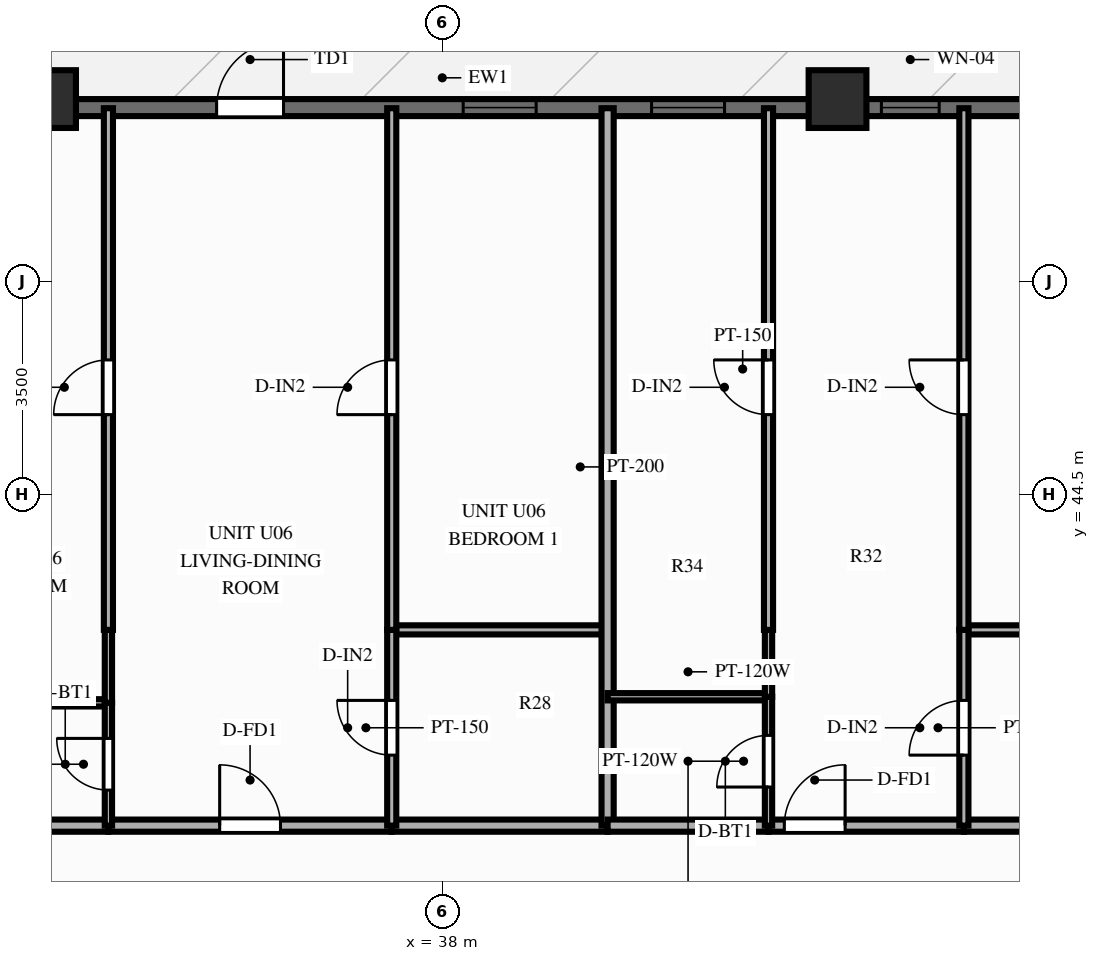
"""IFC4 building model, lengths in metres.
Left out: names, types, materials, properties, quantities, classifications, styles, units other than length and angle.
Written with IfcOpenShell. Run it as: python <this file> out.ifc"""

import sys

from ifc_helpers import new_model, si_unit, direction, frame, frame_2d, origin, origin_2d, place, context, subcontext, project, spatial, rectangle, extrude, source, transform, mapped, element, fill, save


model = new_model("IFC4")
c1 = context("Model", 3, precision=1e-05, world=origin(), true_north=direction((0.0, 1.0)))
c2 = subcontext(c1, "Body", "Model", "MODEL_VIEW")
j1 = project(units=[si_unit("LENGTHUNIT", "METRE"), si_unit("PLANEANGLEUNIT", "RADIAN")], contexts=[c1])
p1 = place(None, origin())
s1 = spatial("IfcSite", under=j1, at=p1, CompositionType="ELEMENT")
p2 = place(p1, origin())
s2 = spatial("IfcBuilding", under=s1, at=p2, CompositionType="ELEMENT")
p3 = place(p2, frame((0.0, 0.0, 89.85)))
s3 = spatial("IfcBuildingStorey", under=s2, at=p3, CompositionType="ELEMENT", Elevation=89.85)
m1 = source(origin(), c2, "Body", "SweptSolid", [
    extrude(rectangle(XDim=0.95, YDim=0.95, at=origin_2d()), origin(), (0.0, 0.0, 1.0), 3.0),
])
for number, where, z_axis, x_axis in (
    (1, (44.5, 51.0, 0.0), (0.0, 0.0, 1.0), (1.0, 0.0, 0.0)),
    (2, (31.5, 51.0, 0.0), (0.0, 0.0, 1.0), (1.0, 0.0, 0.0)),
):
    element("IfcColumn", number, at=place(p3, frame(where, z_axis=z_axis, x_axis=x_axis)), inside=s3, PredefinedType="COLUMN", context=c2, shape_type="MappedRepresentation", body=[
        mapped(m1, transform((0.0, 0.0, 0.0), scale=1.0)),
    ])
p4 = place(p3, frame((16.2, 50.86, 0.0), z_axis=(0.0, 0.0, 1.0), x_axis=(1.0, 0.0, 0.0)))
e3 = element("IfcWall", 3, at=p4, inside=s3, PredefinedType="SOLIDWALL", context=c2, shape_type="SweptSolid", body=[
    extrude(rectangle(XDim=43.6, YDim=0.28, at=frame_2d((21.8, 0.0))), origin(), (0.0, 0.0, 1.0), 2.28),
])
p5 = place(p4, frame((0.722, 0.0, 0.25)))
e4 = element("IfcOpeningElement", 4, at=p5, cuts=e3, PredefinedType="OPENING", context=c2, shape_type="SweptSolid", body=[
    extrude(rectangle(XDim=1.2, YDim=1.5, at=frame_2d((0.6, 0.75))), frame((0.0, 0.152, 0.0), z_axis=(0.0, -1.0, 0.0), x_axis=(1.0, 0.0, 0.0)), (0.0, 0.0, 1.0), 0.304),
])
p6 = place(p4, frame((3.172, 0.0, 0.25)))
e5 = element("IfcOpeningElement", 5, at=p6, cuts=e3, PredefinedType="OPENING", context=c2, shape_type="SweptSolid", body=[
    extrude(rectangle(XDim=1.2, YDim=1.5, at=frame_2d((0.6, 0.75))), frame((0.0, 0.152, 0.0), z_axis=(0.0, -1.0, 0.0), x_axis=(1.0, 0.0, 0.0)), (0.0, 0.0, 1.0), 0.304),
])
p7 = place(p4, frame((6.944, 0.0, 0.25)))
e6 = element("IfcOpeningElement", 6, at=p7, cuts=e3, PredefinedType="OPENING", context=c2, shape_type="SweptSolid", body=[
    extrude(rectangle(XDim=1.2, YDim=1.5, at=frame_2d((0.6, 0.75))), frame((0.0, 0.152, 0.0), z_axis=(0.0, -1.0, 0.0), x_axis=(1.0, 0.0, 0.0)), (0.0, 0.0, 1.0), 0.304),
])
p8 = place(p4, frame((11.049, 0.0, 0.25)))
e7 = element("IfcOpeningElement", 7, at=p8, cuts=e3, PredefinedType="OPENING", context=c2, shape_type="SweptSolid", body=[
    extrude(rectangle(XDim=1.2, YDim=1.5, at=frame_2d((0.6, 0.75))), frame((0.0, 0.152, 0.0), z_axis=(0.0, -1.0, 0.0), x_axis=(1.0, 0.0, 0.0)), (0.0, 0.0, 1.0), 0.304),
])
p9 = place(p4, frame((13.73, 0.0, 0.25)))
e8 = element("IfcOpeningElement", 8, at=p9, cuts=e3, PredefinedType="OPENING", context=c2, shape_type="SweptSolid", body=[
    extrude(rectangle(XDim=0.95, YDim=1.5, at=frame_2d((0.475, 0.75))), frame((0.0, 0.152, 0.0), z_axis=(0.0, -1.0, 0.0), x_axis=(1.0, 0.0, 0.0)), (0.0, 0.0, 1.0), 0.304),
])
p10 = place(p4, frame((18.089, 0.0, 0.0)))
e9 = element("IfcOpeningElement", 9, at=p10, cuts=e3, PredefinedType="OPENING", context=c2, shape_type="SweptSolid", body=[
    extrude(rectangle(XDim=1.1, YDim=2.15, at=frame_2d((0.55, 1.075))), frame((0.0, 0.152, 0.0), z_axis=(0.0, -1.0, 0.0), x_axis=(1.0, 0.0, 0.0)), (0.0, 0.0, 1.0), 0.304),
])
p11 = place(p4, frame((22.144, 0.0, 0.25)))
e10 = element("IfcOpeningElement", 10, at=p11, cuts=e3, PredefinedType="OPENING", context=c2, shape_type="SweptSolid", body=[
    extrude(rectangle(XDim=1.2, YDim=1.5, at=frame_2d((0.6, 0.75))), frame((0.0, 0.152, 0.0), z_axis=(0.0, -1.0, 0.0), x_axis=(1.0, 0.0, 0.0)), (0.0, 0.0, 1.0), 0.304),
])
p12 = place(p4, frame((25.242, 0.0, 0.25)))
e11 = element("IfcOpeningElement", 11, at=p12, cuts=e3, PredefinedType="OPENING", context=c2, shape_type="SweptSolid", body=[
    extrude(rectangle(XDim=1.2, YDim=1.5, at=frame_2d((0.6, 0.75))), frame((0.0, 0.152, 0.0), z_axis=(0.0, -1.0, 0.0), x_axis=(1.0, 0.0, 0.0)), (0.0, 0.0, 1.0), 0.304),
])
p13 = place(p4, frame((29.021, 0.0, 0.25)))
e12 = element("IfcOpeningElement", 12, at=p13, cuts=e3, PredefinedType="OPENING", context=c2, shape_type="SweptSolid", body=[
    extrude(rectangle(XDim=0.95, YDim=1.5, at=frame_2d((0.475, 0.75))), frame((0.0, 0.152, 0.0), z_axis=(0.0, -1.0, 0.0), x_axis=(1.0, 0.0, 0.0)), (0.0, 0.0, 1.0), 0.304),
])
p14 = place(p4, frame((31.574, 0.0, 0.25)))
e13 = element("IfcOpeningElement", 13, at=p14, cuts=e3, PredefinedType="OPENING", context=c2, shape_type="SweptSolid", body=[
    extrude(rectangle(XDim=1.2, YDim=1.5, at=frame_2d((0.6, 0.75))), frame((0.0, 0.152, 0.0), z_axis=(0.0, -1.0, 0.0), x_axis=(1.0, 0.0, 0.0)), (0.0, 0.0, 1.0), 0.304),
])
p15 = place(p4, frame((34.692, 0.0, 0.25)))
e14 = element("IfcOpeningElement", 14, at=p15, cuts=e3, PredefinedType="OPENING", context=c2, shape_type="SweptSolid", body=[
    extrude(rectangle(XDim=1.2, YDim=1.5, at=frame_2d((0.6, 0.75))), frame((0.0, 0.152, 0.0), z_axis=(0.0, -1.0, 0.0), x_axis=(1.0, 0.0, 0.0)), (0.0, 0.0, 1.0), 0.304),
])
p16 = place(p4, frame((37.622, 0.0, 0.25)))
e15 = element("IfcOpeningElement", 15, at=p16, cuts=e3, PredefinedType="OPENING", context=c2, shape_type="SweptSolid", body=[
    extrude(rectangle(XDim=1.2, YDim=1.5, at=frame_2d((0.6, 0.75))), frame((0.0, 0.152, 0.0), z_axis=(0.0, -1.0, 0.0), x_axis=(1.0, 0.0, 0.0)), (0.0, 0.0, 1.0), 0.304),
])
p17 = place(p4, frame((40.957, 0.0, 0.25)))
e16 = element("IfcOpeningElement", 16, at=p17, cuts=e3, PredefinedType="OPENING", context=c2, shape_type="SweptSolid", body=[
    extrude(rectangle(XDim=1.2, YDim=1.5, at=frame_2d((0.6, 0.75))), frame((0.0, 0.152, 0.0), z_axis=(0.0, -1.0, 0.0), x_axis=(1.0, 0.0, 0.0)), (0.0, 0.0, 1.0), 0.304),
])
p18 = place(p3, frame((29.624, 39.05, 0.0), z_axis=(0.0, 0.0, 1.0), x_axis=(1.0, 0.0, 0.0)))
e17 = element("IfcWall", 17, at=p18, inside=s3, PredefinedType="PARTITIONING", context=c2, shape_type="SweptSolid", body=[
    extrude(rectangle(XDim=2.885, YDim=0.2, at=frame_2d((1.442, 0.0))), origin(), (0.0, 0.0, 1.0), 2.79),
])
p19 = place(p3, frame((32.509, 39.05, 0.0), z_axis=(0.0, 0.0, 1.0), x_axis=(1.0, 0.0, 0.0)))
e18 = element("IfcWall", 18, at=p19, inside=s3, PredefinedType="PARTITIONING", context=c2, shape_type="SweptSolid", body=[
    extrude(rectangle(XDim=4.66, YDim=0.2, at=frame_2d((2.33, 0.0))), origin(), (0.0, 0.0, 1.0), 2.79),
])
p20 = place(p19, frame((1.83, 0.0, 0.0)))
e19 = element("IfcOpeningElement", 19, at=p20, cuts=e18, PredefinedType="OPENING", context=c2, shape_type="SweptSolid", body=[
    extrude(rectangle(XDim=1.0, YDim=2.15, at=frame_2d((0.5, 1.075))), frame((0.0, 0.112, 0.0), z_axis=(0.0, -1.0, 0.0), x_axis=(1.0, 0.0, 0.0)), (0.0, 0.0, 1.0), 0.224),
])
p21 = place(p3, frame((37.168, 39.05, 0.0), z_axis=(0.0, 0.0, 1.0), x_axis=(1.0, 0.0, 0.0)))
e20 = element("IfcWall", 20, at=p21, inside=s3, PredefinedType="PARTITIONING", context=c2, shape_type="SweptSolid", body=[
    extrude(rectangle(XDim=3.55, YDim=0.2, at=frame_2d((1.775, 0.0))), origin(), (0.0, 0.0, 1.0), 2.79),
])
p22 = place(p3, frame((29.624, 41.07, 0.0), z_axis=(0.0, 0.0, 1.0), x_axis=(1.0, 0.0, 0.0)))
e21 = element("IfcWall", 21, at=p22, inside=s3, PredefinedType="PARTITIONING", context=c2, shape_type="SweptSolid", body=[
    extrude(rectangle(XDim=2.885, YDim=0.12, at=frame_2d((1.442, 0.0))), origin(), (0.0, 0.0, 1.0), 2.79),
])
p23 = place(p3, frame((37.168, 42.27, 0.0), z_axis=(0.0, 0.0, 1.0), x_axis=(1.0, 0.0, 0.0)))
e22 = element("IfcWall", 22, at=p23, inside=s3, PredefinedType="PARTITIONING", context=c2, shape_type="SweptSolid", body=[
    extrude(rectangle(XDim=3.55, YDim=0.15, at=frame_2d((1.775, 0.0))), origin(), (0.0, 0.0, 1.0), 2.79),
])
p24 = place(p3, frame((32.509, 39.05, 0.0), z_axis=(0.0, 0.0, 1.0), x_axis=(0.0, 1.0, 0.0)))
e23 = element("IfcWall", 23, at=p24, inside=s3, PredefinedType="PARTITIONING", context=c2, shape_type="SweptSolid", body=[
    extrude(rectangle(XDim=2.02, YDim=0.12, at=frame_2d((1.01, 0.0))), origin(), (0.0, 0.0, 1.0), 2.79),
])
p25 = place(p24, frame((0.585, 0.0, 0.0)))
e24 = element("IfcOpeningElement", 24, at=p25, cuts=e23, PredefinedType="OPENING", context=c2, shape_type="SweptSolid", body=[
    extrude(rectangle(XDim=0.85, YDim=2.05, at=frame_2d((0.425, 1.025))), frame((0.0, 0.072, 0.0), z_axis=(0.0, -1.0, 0.0), x_axis=(1.0, 0.0, 0.0)), (0.0, 0.0, 1.0), 0.144),
])
p26 = place(p3, frame((32.509, 41.07, 0.0), z_axis=(0.0, 0.0, 1.0), x_axis=(0.0, 1.0, 0.0)))
e25 = element("IfcWall", 25, at=p26, inside=s3, PredefinedType="PARTITIONING", context=c2, shape_type="SweptSolid", body=[
    extrude(rectangle(XDim=1.2, YDim=0.12, at=frame_2d((0.6, 0.0))), origin(), (0.0, 0.0, 1.0), 2.79),
])
p27 = place(p3, frame((32.509, 42.27, 0.0), z_axis=(0.0, 0.0, 1.0), x_axis=(0.0, 1.0, 0.0)))
e26 = element("IfcWall", 26, at=p27, inside=s3, PredefinedType="PARTITIONING", context=c2, shape_type="SweptSolid", body=[
    extrude(rectangle(XDim=8.58, YDim=0.15, at=frame_2d((4.29, 0.0))), origin(), (0.0, 0.0, 1.0), 2.79),
])
p28 = place(p27, frame((3.54, 0.0, 0.0)))
e27 = element("IfcOpeningElement", 27, at=p28, cuts=e26, PredefinedType="OPENING", context=c2, shape_type="SweptSolid", body=[
    extrude(rectangle(XDim=0.9, YDim=2.1, at=frame_2d((0.45, 1.05))), frame((0.0, 0.087, 0.0), z_axis=(0.0, -1.0, 0.0), x_axis=(1.0, 0.0, 0.0)), (0.0, 0.0, 1.0), 0.174),
])
p29 = place(p3, frame((37.168, 39.05, 0.0), z_axis=(0.0, 0.0, 1.0), x_axis=(0.0, 1.0, 0.0)))
e28 = element("IfcWall", 28, at=p29, inside=s3, PredefinedType="PARTITIONING", context=c2, shape_type="SweptSolid", body=[
    extrude(rectangle(XDim=3.22, YDim=0.15, at=frame_2d((1.61, 0.0))), origin(), (0.0, 0.0, 1.0), 2.79),
])
p30 = place(p29, frame((1.16, 0.0, 0.0)))
e29 = element("IfcOpeningElement", 29, at=p30, cuts=e28, PredefinedType="OPENING", context=c2, shape_type="SweptSolid", body=[
    extrude(rectangle(XDim=0.9, YDim=2.1, at=frame_2d((0.45, 1.05))), frame((0.0, 0.087, 0.0), z_axis=(0.0, -1.0, 0.0), x_axis=(1.0, 0.0, 0.0)), (0.0, 0.0, 1.0), 0.174),
])
p31 = place(p3, frame((37.168, 42.27, 0.0), z_axis=(0.0, 0.0, 1.0), x_axis=(0.0, 1.0, 0.0)))
e30 = element("IfcWall", 30, at=p31, inside=s3, PredefinedType="PARTITIONING", context=c2, shape_type="SweptSolid", body=[
    extrude(rectangle(XDim=8.58, YDim=0.15, at=frame_2d((4.29, 0.0))), origin(), (0.0, 0.0, 1.0), 2.79),
])
p32 = place(p31, frame((3.54, 0.0, 0.0)))
e31 = element("IfcOpeningElement", 31, at=p32, cuts=e30, PredefinedType="OPENING", context=c2, shape_type="SweptSolid", body=[
    extrude(rectangle(XDim=0.9, YDim=2.1, at=frame_2d((0.45, 1.05))), frame((0.0, 0.087, 0.0), z_axis=(0.0, -1.0, 0.0), x_axis=(1.0, 0.0, 0.0)), (0.0, 0.0, 1.0), 0.174),
])
p33 = place(p3, frame((40.719, 39.05, 0.0), z_axis=(0.0, 0.0, 1.0), x_axis=(0.0, 1.0, 0.0)))
e32 = element("IfcWall", 32, at=p33, inside=s3, PredefinedType="PARTITIONING", context=c2, shape_type="SweptSolid", body=[
    extrude(rectangle(XDim=11.8, YDim=0.2, at=frame_2d((5.9, 0.0))), origin(), (0.0, 0.0, 1.0), 2.79),
])
p34 = place(p3, frame((40.719, 39.05, 0.0), z_axis=(0.0, 0.0, 1.0), x_axis=(1.0, 0.0, 0.0)))
e33 = element("IfcWall", 33, at=p34, inside=s3, PredefinedType="PARTITIONING", context=c2, shape_type="SweptSolid", body=[
    extrude(rectangle(XDim=2.646, YDim=0.2, at=frame_2d((1.323, 0.0))), origin(), (0.0, 0.0, 1.0), 2.79),
])
p35 = place(p3, frame((43.365, 39.05, 0.0), z_axis=(0.0, 0.0, 1.0), x_axis=(1.0, 0.0, 0.0)))
e34 = element("IfcWall", 34, at=p35, inside=s3, PredefinedType="PARTITIONING", context=c2, shape_type="SweptSolid", body=[
    extrude(rectangle(XDim=3.213, YDim=0.2, at=frame_2d((1.606, 0.0))), origin(), (0.0, 0.0, 1.0), 2.79),
])
p36 = place(p35, frame((0.26, 0.0, 0.0)))
e35 = element("IfcOpeningElement", 35, at=p36, cuts=e34, PredefinedType="OPENING", context=c2, shape_type="SweptSolid", body=[
    extrude(rectangle(XDim=1.0, YDim=2.15, at=frame_2d((0.5, 1.075))), frame((0.0, 0.112, 0.0), z_axis=(0.0, -1.0, 0.0), x_axis=(1.0, 0.0, 0.0)), (0.0, 0.0, 1.0), 0.224),
])
p37 = place(p3, frame((46.578, 39.05, 0.0), z_axis=(0.0, 0.0, 1.0), x_axis=(1.0, 0.0, 0.0)))
e36 = element("IfcWall", 36, at=p37, inside=s3, PredefinedType="PARTITIONING", context=c2, shape_type="SweptSolid", body=[
    extrude(rectangle(XDim=3.591, YDim=0.2, at=frame_2d((1.796, 0.0))), origin(), (0.0, 0.0, 1.0), 2.79),
])
p38 = place(p3, frame((40.719, 41.17, 0.0), z_axis=(0.0, 0.0, 1.0), x_axis=(1.0, 0.0, 0.0)))
e37 = element("IfcWall", 37, at=p38, inside=s3, PredefinedType="PARTITIONING", context=c2, shape_type="SweptSolid", body=[
    extrude(rectangle(XDim=2.646, YDim=0.12, at=frame_2d((1.323, 0.0))), origin(), (0.0, 0.0, 1.0), 2.79),
])
p39 = place(p3, frame((46.578, 42.27, 0.0), z_axis=(0.0, 0.0, 1.0), x_axis=(1.0, 0.0, 0.0)))
e38 = element("IfcWall", 38, at=p39, inside=s3, PredefinedType="PARTITIONING", context=c2, shape_type="SweptSolid", body=[
    extrude(rectangle(XDim=3.591, YDim=0.15, at=frame_2d((1.796, 0.0))), origin(), (0.0, 0.0, 1.0), 2.79),
])
p40 = place(p3, frame((43.365, 39.05, 0.0), z_axis=(0.0, 0.0, 1.0), x_axis=(0.0, 1.0, 0.0)))
e39 = element("IfcWall", 39, at=p40, inside=s3, PredefinedType="PARTITIONING", context=c2, shape_type="SweptSolid", body=[
    extrude(rectangle(XDim=2.12, YDim=0.12, at=frame_2d((1.06, 0.0))), origin(), (0.0, 0.0, 1.0), 2.79),
])
p41 = place(p40, frame((0.635, 0.0, 0.0)))
e40 = element("IfcOpeningElement", 40, at=p41, cuts=e39, PredefinedType="OPENING", context=c2, shape_type="SweptSolid", body=[
    extrude(rectangle(XDim=0.85, YDim=2.05, at=frame_2d((0.425, 1.025))), frame((0.0, 0.072, 0.0), z_axis=(0.0, -1.0, 0.0), x_axis=(1.0, 0.0, 0.0)), (0.0, 0.0, 1.0), 0.144),
])
p42 = place(p3, frame((43.365, 41.17, 0.0), z_axis=(0.0, 0.0, 1.0), x_axis=(0.0, 1.0, 0.0)))
e41 = element("IfcWall", 41, at=p42, inside=s3, PredefinedType="PARTITIONING", context=c2, shape_type="SweptSolid", body=[
    extrude(rectangle(XDim=1.1, YDim=0.12, at=frame_2d((0.55, 0.0))), origin(), (0.0, 0.0, 1.0), 2.79),
])
p43 = place(p3, frame((43.365, 42.27, 0.0), z_axis=(0.0, 0.0, 1.0), x_axis=(0.0, 1.0, 0.0)))
e42 = element("IfcWall", 42, at=p43, inside=s3, PredefinedType="PARTITIONING", context=c2, shape_type="SweptSolid", body=[
    extrude(rectangle(XDim=8.58, YDim=0.15, at=frame_2d((4.29, 0.0))), origin(), (0.0, 0.0, 1.0), 2.79),
])
p44 = place(p43, frame((3.54, 0.0, 0.0)))
e43 = element("IfcOpeningElement", 43, at=p44, cuts=e42, PredefinedType="OPENING", context=c2, shape_type="SweptSolid", body=[
    extrude(rectangle(XDim=0.9, YDim=2.1, at=frame_2d((0.45, 1.05))), frame((0.0, 0.087, 0.0), z_axis=(0.0, -1.0, 0.0), x_axis=(1.0, 0.0, 0.0)), (0.0, 0.0, 1.0), 0.174),
])
p45 = place(p3, frame((46.578, 39.05, 0.0), z_axis=(0.0, 0.0, 1.0), x_axis=(0.0, 1.0, 0.0)))
e44 = element("IfcWall", 44, at=p45, inside=s3, PredefinedType="PARTITIONING", context=c2, shape_type="SweptSolid", body=[
    extrude(rectangle(XDim=3.22, YDim=0.15, at=frame_2d((1.61, 0.0))), origin(), (0.0, 0.0, 1.0), 2.79),
])
p46 = place(p45, frame((1.16, 0.0, 0.0)))
e45 = element("IfcOpeningElement", 45, at=p46, cuts=e44, PredefinedType="OPENING", context=c2, shape_type="SweptSolid", body=[
    extrude(rectangle(XDim=0.9, YDim=2.1, at=frame_2d((0.45, 1.05))), frame((0.0, 0.087, 0.0), z_axis=(0.0, -1.0, 0.0), x_axis=(1.0, 0.0, 0.0)), (0.0, 0.0, 1.0), 0.174),
])
p47 = place(p3, frame((46.578, 42.27, 0.0), z_axis=(0.0, 0.0, 1.0), x_axis=(0.0, 1.0, 0.0)))
e46 = element("IfcWall", 46, at=p47, inside=s3, PredefinedType="PARTITIONING", context=c2, shape_type="SweptSolid", body=[
    extrude(rectangle(XDim=8.58, YDim=0.15, at=frame_2d((4.29, 0.0))), origin(), (0.0, 0.0, 1.0), 2.79),
])
p48 = place(p47, frame((3.54, 0.0, 0.0)))
e47 = element("IfcOpeningElement", 47, at=p48, cuts=e46, PredefinedType="OPENING", context=c2, shape_type="SweptSolid", body=[
    extrude(rectangle(XDim=0.9, YDim=2.1, at=frame_2d((0.45, 1.05))), frame((0.0, 0.087, 0.0), z_axis=(0.0, -1.0, 0.0), x_axis=(1.0, 0.0, 0.0)), (0.0, 0.0, 1.0), 0.174),
])
m2 = source(origin(), c2, "Body", "SweptSolid", [
    extrude(rectangle(XDim=1.1, YDim=2.15, at=frame_2d((0.55, 1.075))), frame((0.0, 0.025, 0.0), z_axis=(0.0, -1.0, 0.0), x_axis=(1.0, 0.0, 0.0)), (0.0, 0.0, 1.0), 0.05),
])
p49 = place(p10, origin())
e48 = element("IfcDoor", 48, at=p49, inside=s3, OperationType="SINGLE_SWING_RIGHT", PredefinedType="DOOR", context=c2, shape_type="MappedRepresentation", body=[
    mapped(m2, transform((0.0, 0.0, 0.0), scale=1.0)),
])
fill(e9, e48)
m3 = source(origin(), c2, "Body", "SweptSolid", [
    extrude(rectangle(XDim=1.2, YDim=1.5, at=frame_2d((0.6, 0.75))), frame((0.0, 0.03, 0.0), z_axis=(0.0, -1.0, 0.0), x_axis=(1.0, 0.0, 0.0)), (0.0, 0.0, 1.0), 0.06),
])
p50 = place(p11, origin())
e49 = element("IfcWindow", 49, at=p50, inside=s3, PartitioningType="SINGLE_PANEL", PredefinedType="WINDOW", context=c2, shape_type="MappedRepresentation", body=[
    mapped(m3, transform((0.0, 0.0, 0.0), scale=1.0)),
])
fill(e10, e49)
p51 = place(p12, origin())
e50 = element("IfcWindow", 50, at=p51, inside=s3, PartitioningType="SINGLE_PANEL", PredefinedType="WINDOW", context=c2, shape_type="MappedRepresentation", body=[
    mapped(m3, transform((0.0, 0.0, 0.0), scale=1.0)),
])
fill(e11, e50)
m4 = source(origin(), c2, "Body", "SweptSolid", [
    extrude(rectangle(XDim=0.95, YDim=1.5, at=frame_2d((0.475, 0.75))), frame((0.0, 0.03, 0.0), z_axis=(0.0, -1.0, 0.0), x_axis=(1.0, 0.0, 0.0)), (0.0, 0.0, 1.0), 0.06),
])
p52 = place(p13, origin())
e51 = element("IfcWindow", 51, at=p52, inside=s3, PartitioningType="SINGLE_PANEL", PredefinedType="WINDOW", context=c2, shape_type="MappedRepresentation", body=[
    mapped(m4, transform((0.0, 0.0, 0.0), scale=1.0)),
])
fill(e12, e51)
m5 = source(origin(), c2, "Body", "SweptSolid", [
    extrude(rectangle(XDim=1.0, YDim=2.15, at=frame_2d((0.5, 1.075))), frame((0.0, 0.025, 0.0), z_axis=(0.0, -1.0, 0.0), x_axis=(1.0, 0.0, 0.0)), (0.0, 0.0, 1.0), 0.05),
])
p53 = place(p20, origin())
e52 = element("IfcDoor", 52, at=p53, inside=s3, OperationType="SINGLE_SWING_LEFT", PredefinedType="DOOR", context=c2, shape_type="MappedRepresentation", body=[
    mapped(m5, transform((0.0, 0.0, 0.0), scale=1.0)),
])
fill(e19, e52)
m6 = source(origin(), c2, "Body", "SweptSolid", [
    extrude(rectangle(XDim=0.85, YDim=2.05, at=frame_2d((0.425, 1.025))), frame((0.0, 0.025, 0.0), z_axis=(0.0, -1.0, 0.0), x_axis=(1.0, 0.0, 0.0)), (0.0, 0.0, 1.0), 0.05),
])
p54 = place(p25, origin())
e53 = element("IfcDoor", 53, at=p54, inside=s3, OperationType="SINGLE_SWING_RIGHT", PredefinedType="DOOR", context=c2, shape_type="MappedRepresentation", body=[
    mapped(m6, transform((0.0, 0.0, 0.0), scale=1.0)),
])
fill(e24, e53)
m7 = source(origin(), c2, "Body", "SweptSolid", [
    extrude(rectangle(XDim=0.9, YDim=2.1, at=frame_2d((0.45, 1.05))), frame((0.0, 0.025, 0.0), z_axis=(0.0, -1.0, 0.0), x_axis=(1.0, 0.0, 0.0)), (0.0, 0.0, 1.0), 0.05),
])
p55 = place(p28, origin())
e54 = element("IfcDoor", 54, at=p55, inside=s3, OperationType="SINGLE_SWING_LEFT", PredefinedType="DOOR", context=c2, shape_type="MappedRepresentation", body=[
    mapped(m7, transform((0.0, 0.0, 0.0), scale=1.0)),
])
fill(e27, e54)
p56 = place(p30, origin())
e55 = element("IfcDoor", 55, at=p56, inside=s3, OperationType="SINGLE_SWING_RIGHT", PredefinedType="DOOR", context=c2, shape_type="MappedRepresentation", body=[
    mapped(m7, transform((0.0, 0.0, 0.0), scale=1.0)),
])
fill(e29, e55)
p57 = place(p32, origin())
e56 = element("IfcDoor", 56, at=p57, inside=s3, OperationType="SINGLE_SWING_LEFT", PredefinedType="DOOR", context=c2, shape_type="MappedRepresentation", body=[
    mapped(m7, transform((0.0, 0.0, 0.0), scale=1.0)),
])
fill(e31, e56)
p58 = place(p36, origin())
e57 = element("IfcDoor", 57, at=p58, inside=s3, OperationType="SINGLE_SWING_RIGHT", PredefinedType="DOOR", context=c2, shape_type="MappedRepresentation", body=[
    mapped(m5, transform((0.0, 0.0, 0.0), scale=1.0)),
])
fill(e35, e57)
p59 = place(p41, origin())
e58 = element("IfcDoor", 58, at=p59, inside=s3, OperationType="SINGLE_SWING_LEFT", PredefinedType="DOOR", context=c2, shape_type="MappedRepresentation", body=[
    mapped(m6, transform((0.0, 0.0, 0.0), scale=1.0)),
])
fill(e40, e58)
p60 = place(p44, origin())
e59 = element("IfcDoor", 59, at=p60, inside=s3, OperationType="SINGLE_SWING_RIGHT", PredefinedType="DOOR", context=c2, shape_type="MappedRepresentation", body=[
    mapped(m7, transform((0.0, 0.0, 0.0), scale=1.0)),
])
fill(e43, e59)
p61 = place(p46, origin())
e60 = element("IfcDoor", 60, at=p61, inside=s3, OperationType="SINGLE_SWING_LEFT", PredefinedType="DOOR", context=c2, shape_type="MappedRepresentation", body=[
    mapped(m7, transform((0.0, 0.0, 0.0), scale=1.0)),
])
fill(e45, e60)
p62 = place(p48, origin())
e61 = element("IfcDoor", 61, at=p62, inside=s3, OperationType="SINGLE_SWING_RIGHT", PredefinedType="DOOR", context=c2, shape_type="MappedRepresentation", body=[
    mapped(m7, transform((0.0, 0.0, 0.0), scale=1.0)),
])
fill(e47, e61)
save(model, sys.argv[1])
